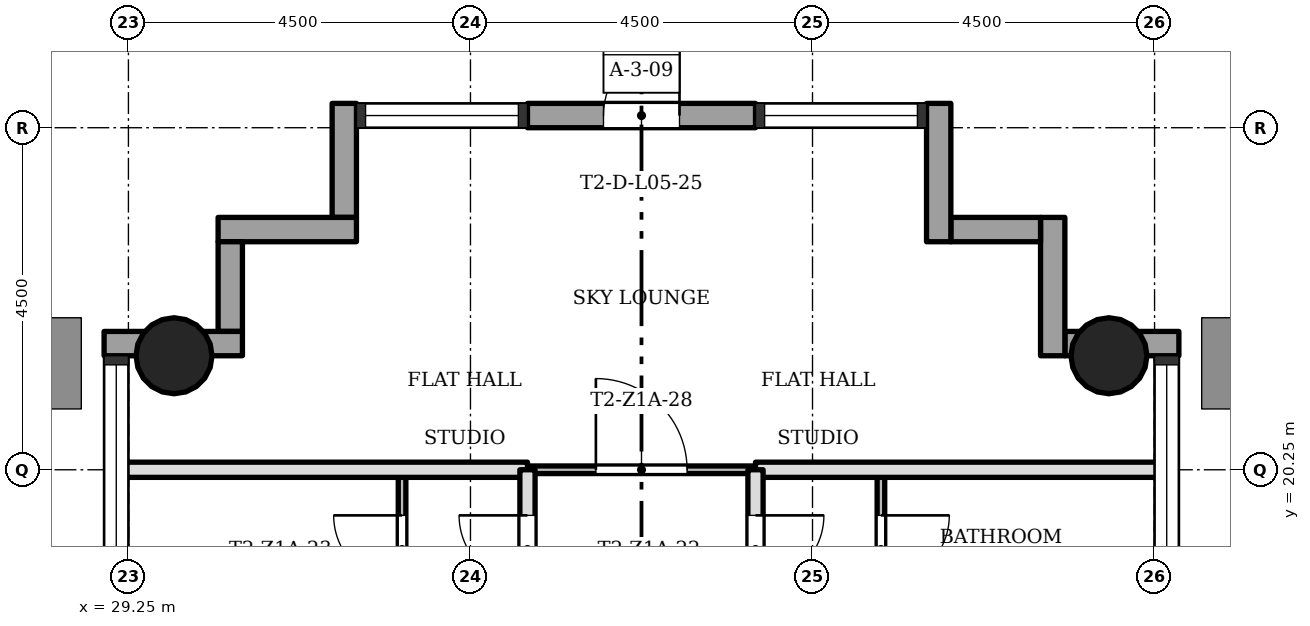
"""IFC4 building model, lengths in metres.
Left out: names, types, materials, properties, quantities, classifications, styles, units other than length and angle.
Written with IfcOpenShell. Run it as: python <this file> out.ifc"""

import sys

from ifc_helpers import new_model, si_unit, direction, frame, frame_2d, origin, origin_2d, place, context, subcontext, project, spatial, rectangle, hollow_circle, extrude, element, fill, save


model = new_model("IFC4")
c1 = context("Model", 3, precision=1e-05, world=origin(), true_north=direction((0.0, 1.0)))
c2 = subcontext(c1, "Body", "Model", "MODEL_VIEW")
j1 = project(units=[si_unit("LENGTHUNIT", "METRE"), si_unit("PLANEANGLEUNIT", "RADIAN")], contexts=[c1])
p1 = place(None, origin())
s1 = spatial("IfcSite", under=j1, at=p1, CompositionType="ELEMENT")
p2 = place(p1, origin())
s2 = spatial("IfcBuilding", under=s1, at=p2, CompositionType="ELEMENT")
p3 = place(p2, frame((0.0, 0.0, 24.5)))
s3 = spatial("IfcBuildingStorey", under=s2, at=p3, CompositionType="ELEMENT", Elevation=24.5)
for number, where, z_axis, x_axis in (
    (1, (42.15, 21.75, 0.0), (0.0, 0.0, 1.0), (1.0, 0.0, 0.0)),
    (2, (29.85, 21.75, 0.0), (0.0, 0.0, 1.0), (1.0, 0.0, 0.0)),
):
    element("IfcColumn", number, at=place(p3, frame(where, z_axis=z_axis, x_axis=x_axis)), inside=s3, PredefinedType="COLUMN", context=c2, shape_type="SweptSolid", body=[
        extrude(hollow_circle(Radius=0.5, WallThickness=0.036, at=origin_2d()), origin(), (0.0, 0.0, 1.0), 3.4),
    ])
p4 = place(p3, frame((43.07, 21.91, 0.0), z_axis=(0.0, 0.0, 1.0), x_axis=(-1.0, 0.0, 0.0)))
e3 = element("IfcWall", 3, at=p4, inside=s3, PredefinedType="STANDARD", context=c2, shape_type="SweptSolid", body=[
    extrude(rectangle(XDim=1.5, YDim=0.32, at=frame_2d((0.75, 0.0))), origin(), (0.0, 0.0, 1.0), 3.1),
])
p5 = place(p3, frame((41.41, 21.75, 0.0), z_axis=(0.0, 0.0, 1.0), x_axis=(0.0, 1.0, 0.0)))
e4 = element("IfcWall", 4, at=p5, inside=s3, PredefinedType="STANDARD", context=c2, shape_type="SweptSolid", body=[
    extrude(rectangle(XDim=1.82, YDim=0.32, at=frame_2d((0.91, 0.0))), origin(), (0.0, 0.0, 1.0), 3.1),
])
p6 = place(p3, frame((41.25, 23.41, 0.0), z_axis=(0.0, 0.0, 1.0), x_axis=(-1.0, 0.0, 0.0)))
e5 = element("IfcWall", 5, at=p6, inside=s3, PredefinedType="STANDARD", context=c2, shape_type="SweptSolid", body=[
    extrude(rectangle(XDim=1.18, YDim=0.32, at=frame_2d((0.59, 0.0))), origin(), (0.0, 0.0, 1.0), 3.1),
])
p7 = place(p3, frame((39.91, 23.25, 0.0), z_axis=(0.0, 0.0, 1.0), x_axis=(0.0, 1.0, 0.0)))
e6 = element("IfcWall", 6, at=p7, inside=s3, PredefinedType="STANDARD", context=c2, shape_type="SweptSolid", body=[
    extrude(rectangle(XDim=1.82, YDim=0.32, at=frame_2d((0.91, 0.0))), origin(), (0.0, 0.0, 1.0), 3.1),
])
p8 = place(p3, frame((37.5, 24.91, 0.0), z_axis=(0.0, 0.0, 1.0), x_axis=(-1.0, 0.0, 0.0)))
e7 = element("IfcWall", 7, at=p8, inside=s3, PredefinedType="STANDARD", context=c2, shape_type="SweptSolid", body=[
    extrude(rectangle(XDim=3.0, YDim=0.32, at=frame_2d((1.5, 0.0))), origin(), (0.0, 0.0, 1.0), 3.1),
])
p9 = place(p8, frame((1.0, 0.0, 0.0)))
e8 = element("IfcOpeningElement", 8, at=p9, cuts=e7, PredefinedType="OPENING", context=c2, shape_type="SweptSolid", body=[
    extrude(rectangle(XDim=1.0, YDim=2.1, at=frame_2d((0.5, 1.05))), frame((0.0, 0.17, 0.0), z_axis=(0.0, -1.0, 0.0), x_axis=(1.0, 0.0, 0.0)), (0.0, 0.0, 1.0), 0.34),
])
p10 = place(p3, frame((32.09, 25.07, 0.0), z_axis=(0.0, 0.0, 1.0), x_axis=(0.0, -1.0, 0.0)))
e9 = element("IfcWall", 9, at=p10, inside=s3, PredefinedType="STANDARD", context=c2, shape_type="SweptSolid", body=[
    extrude(rectangle(XDim=1.5, YDim=0.32, at=frame_2d((0.75, 0.0))), origin(), (0.0, 0.0, 1.0), 3.1),
])
p11 = place(p3, frame((32.25, 23.41, 0.0), z_axis=(0.0, 0.0, 1.0), x_axis=(-1.0, 0.0, 0.0)))
e10 = element("IfcWall", 10, at=p11, inside=s3, PredefinedType="STANDARD", context=c2, shape_type="SweptSolid", body=[
    extrude(rectangle(XDim=1.82, YDim=0.32, at=frame_2d((0.91, 0.0))), origin(), (0.0, 0.0, 1.0), 3.1),
])
p12 = place(p3, frame((30.59, 23.25, 0.0), z_axis=(0.0, 0.0, 1.0), x_axis=(0.0, -1.0, 0.0)))
e11 = element("IfcWall", 11, at=p12, inside=s3, PredefinedType="STANDARD", context=c2, shape_type="SweptSolid", body=[
    extrude(rectangle(XDim=1.18, YDim=0.32, at=frame_2d((0.59, 0.0))), origin(), (0.0, 0.0, 1.0), 3.1),
])
p13 = place(p3, frame((30.75, 21.91, 0.0), z_axis=(0.0, 0.0, 1.0), x_axis=(-1.0, 0.0, 0.0)))
e12 = element("IfcWall", 12, at=p13, inside=s3, PredefinedType="STANDARD", context=c2, shape_type="SweptSolid", body=[
    extrude(rectangle(XDim=1.82, YDim=0.32, at=frame_2d((0.91, 0.0))), origin(), (0.0, 0.0, 1.0), 3.1),
])
p14 = place(p3, frame((37.5, 20.25, 0.0), z_axis=(0.0, 0.0, 1.0), x_axis=(-1.0, 0.0, 0.0)))
e13 = element("IfcWall", 13, at=p14, inside=s3, PredefinedType="PARTITIONING", context=c2, shape_type="SweptSolid", body=[
    extrude(rectangle(XDim=3.0, YDim=0.1, at=frame_2d((1.5, 0.0))), origin(), (0.0, 0.0, 1.0), 3.0),
])
p15 = place(p14, frame((0.9, 0.0, 0.0)))
e14 = element("IfcOpeningElement", 14, at=p15, cuts=e13, PredefinedType="OPENING", context=c2, shape_type="SweptSolid", body=[
    extrude(rectangle(XDim=1.2, YDim=2.1, at=frame_2d((0.6, 1.05))), frame((0.0, 0.06, 0.0), z_axis=(0.0, -1.0, 0.0), x_axis=(1.0, 0.0, 0.0)), (0.0, 0.0, 1.0), 0.12),
])
for number, where, z_axis, x_axis in (
    (15, (42.85, 20.25, 0.0), (0.0, 0.0, 1.0), (-1.0, 0.0, 0.0)),
    (16, (34.5, 20.25, 0.0), (0.0, 0.0, 1.0), (-1.0, 0.0, 0.0)),
):
    element("IfcWall", number, at=place(p3, frame(where, z_axis=z_axis, x_axis=x_axis)), inside=s3, PredefinedType="SOLIDWALL", context=c2, shape_type="SweptSolid", body=[
        extrude(rectangle(XDim=5.35, YDim=0.2, at=frame_2d((2.675, 0.0))), origin(), (0.0, 0.0, 1.0), 3.0),
    ])
p16 = place(p3, frame((39.15, 15.75, 0.0), z_axis=(0.0, 0.0, 1.0), x_axis=(0.0, 1.0, 0.0)))
e17 = element("IfcWall", 17, at=p16, inside=s3, PredefinedType="PARTITIONING", context=c2, shape_type="SweptSolid", body=[
    extrude(rectangle(XDim=4.5, YDim=0.1, at=frame_2d((2.25, 0.0))), origin(), (0.0, 0.0, 1.0), 3.0),
])
p17 = place(p16, frame((3.0, 0.0, 0.0)))
e18 = element("IfcOpeningElement", 18, at=p17, cuts=e17, PredefinedType="OPENING", context=c2, shape_type="SweptSolid", body=[
    extrude(rectangle(XDim=0.9, YDim=2.1, at=frame_2d((0.45, 1.05))), frame((0.0, 0.06, 0.0), z_axis=(0.0, -1.0, 0.0), x_axis=(1.0, 0.0, 0.0)), (0.0, 0.0, 1.0), 0.12),
])
p18 = place(p3, frame((37.5, 15.75, 0.0), z_axis=(0.0, 0.0, 1.0), x_axis=(0.0, 1.0, 0.0)))
e19 = element("IfcWall", 19, at=p18, inside=s3, PredefinedType="SOLIDWALL", context=c2, shape_type="SweptSolid", body=[
    extrude(rectangle(XDim=4.5, YDim=0.2, at=frame_2d((2.25, 0.0))), origin(), (0.0, 0.0, 1.0), 3.0),
])
p19 = place(p18, frame((3.0, 0.0, 0.0)))
e20 = element("IfcOpeningElement", 20, at=p19, cuts=e19, PredefinedType="OPENING", context=c2, shape_type="SweptSolid", body=[
    extrude(rectangle(XDim=0.9, YDim=2.1, at=frame_2d((0.45, 1.05))), frame((0.0, 0.11, 0.0), z_axis=(0.0, -1.0, 0.0), x_axis=(1.0, 0.0, 0.0)), (0.0, 0.0, 1.0), 0.22),
])
p20 = place(p3, frame((34.5, 15.75, 0.0), z_axis=(0.0, 0.0, 1.0), x_axis=(0.0, 1.0, 0.0)))
e21 = element("IfcWall", 21, at=p20, inside=s3, PredefinedType="SOLIDWALL", context=c2, shape_type="SweptSolid", body=[
    extrude(rectangle(XDim=4.5, YDim=0.2, at=frame_2d((2.25, 0.0))), origin(), (0.0, 0.0, 1.0), 3.0),
])
p21 = place(p20, frame((3.0, 0.0, 0.0)))
e22 = element("IfcOpeningElement", 22, at=p21, cuts=e21, PredefinedType="OPENING", context=c2, shape_type="SweptSolid", body=[
    extrude(rectangle(XDim=0.9, YDim=2.1, at=frame_2d((0.45, 1.05))), frame((0.0, 0.11, 0.0), z_axis=(0.0, -1.0, 0.0), x_axis=(1.0, 0.0, 0.0)), (0.0, 0.0, 1.0), 0.22),
])
p22 = place(p3, frame((32.85, 15.75, 0.0), z_axis=(0.0, 0.0, 1.0), x_axis=(0.0, 1.0, 0.0)))
e23 = element("IfcWall", 23, at=p22, inside=s3, PredefinedType="PARTITIONING", context=c2, shape_type="SweptSolid", body=[
    extrude(rectangle(XDim=4.5, YDim=0.1, at=frame_2d((2.25, 0.0))), origin(), (0.0, 0.0, 1.0), 3.0),
])
p23 = place(p22, frame((3.0, 0.0, 0.0)))
e24 = element("IfcOpeningElement", 24, at=p23, cuts=e23, PredefinedType="OPENING", context=c2, shape_type="SweptSolid", body=[
    extrude(rectangle(XDim=0.9, YDim=2.1, at=frame_2d((0.45, 1.05))), frame((0.0, 0.06, 0.0), z_axis=(0.0, -1.0, 0.0), x_axis=(1.0, 0.0, 0.0)), (0.0, 0.0, 1.0), 0.12),
])
p24 = place(p9, origin())
e25 = element("IfcDoor", 25, at=p24, inside=s3, OperationType="SINGLE_SWING_LEFT", PredefinedType="DOOR", context=c2, shape_type="SweptSolid", body=[
    extrude(rectangle(XDim=1.0, YDim=2.1, at=frame_2d((0.5, 1.05))), frame((0.0, 0.025, 0.0), z_axis=(0.0, -1.0, 0.0), x_axis=(1.0, 0.0, 0.0)), (0.0, 0.0, 1.0), 0.05),
])
fill(e8, e25)
p25 = place(p21, origin())
e26 = element("IfcDoor", 26, at=p25, inside=s3, OperationType="SINGLE_SWING_LEFT", PredefinedType="DOOR", context=c2, shape_type="SweptSolid", body=[
    extrude(rectangle(XDim=0.9, YDim=2.1, at=frame_2d((0.45, 1.05))), frame((0.0, 0.025, 0.0), z_axis=(0.0, -1.0, 0.0), x_axis=(1.0, 0.0, 0.0)), (0.0, 0.0, 1.0), 0.05),
])
fill(e22, e26)
p26 = place(p23, origin())
e27 = element("IfcDoor", 27, at=p26, inside=s3, OperationType="SINGLE_SWING_LEFT", PredefinedType="DOOR", context=c2, shape_type="SweptSolid", body=[
    extrude(rectangle(XDim=0.9, YDim=2.1, at=frame_2d((0.45, 1.05))), frame((0.0, 0.025, 0.0), z_axis=(0.0, -1.0, 0.0), x_axis=(1.0, 0.0, 0.0)), (0.0, 0.0, 1.0), 0.05),
])
fill(e24, e27)
p27 = place(p19, origin())
e28 = element("IfcDoor", 28, at=p27, inside=s3, OperationType="SINGLE_SWING_RIGHT", PredefinedType="DOOR", context=c2, shape_type="SweptSolid", body=[
    extrude(rectangle(XDim=0.9, YDim=2.1, at=frame_2d((0.45, 1.05))), frame((0.0, 0.025, 0.0), z_axis=(0.0, -1.0, 0.0), x_axis=(1.0, 0.0, 0.0)), (0.0, 0.0, 1.0), 0.05),
])
fill(e20, e28)
p28 = place(p17, origin())
e29 = element("IfcDoor", 29, at=p28, inside=s3, OperationType="SINGLE_SWING_RIGHT", PredefinedType="DOOR", context=c2, shape_type="SweptSolid", body=[
    extrude(rectangle(XDim=0.9, YDim=2.1, at=frame_2d((0.45, 1.05))), frame((0.0, 0.025, 0.0), z_axis=(0.0, -1.0, 0.0), x_axis=(1.0, 0.0, 0.0)), (0.0, 0.0, 1.0), 0.05),
])
fill(e18, e29)
p29 = place(p15, origin())
e30 = element("IfcDoor", 30, at=p29, inside=s3, OperationType="SINGLE_SWING_RIGHT", PredefinedType="DOOR", context=c2, shape_type="SweptSolid", body=[
    extrude(rectangle(XDim=1.2, YDim=2.1, at=frame_2d((0.6, 1.05))), frame((0.0, 0.025, 0.0), z_axis=(0.0, -1.0, 0.0), x_axis=(1.0, 0.0, 0.0)), (0.0, 0.0, 1.0), 0.05),
])
fill(e14, e30)
save(model, sys.argv[1])
